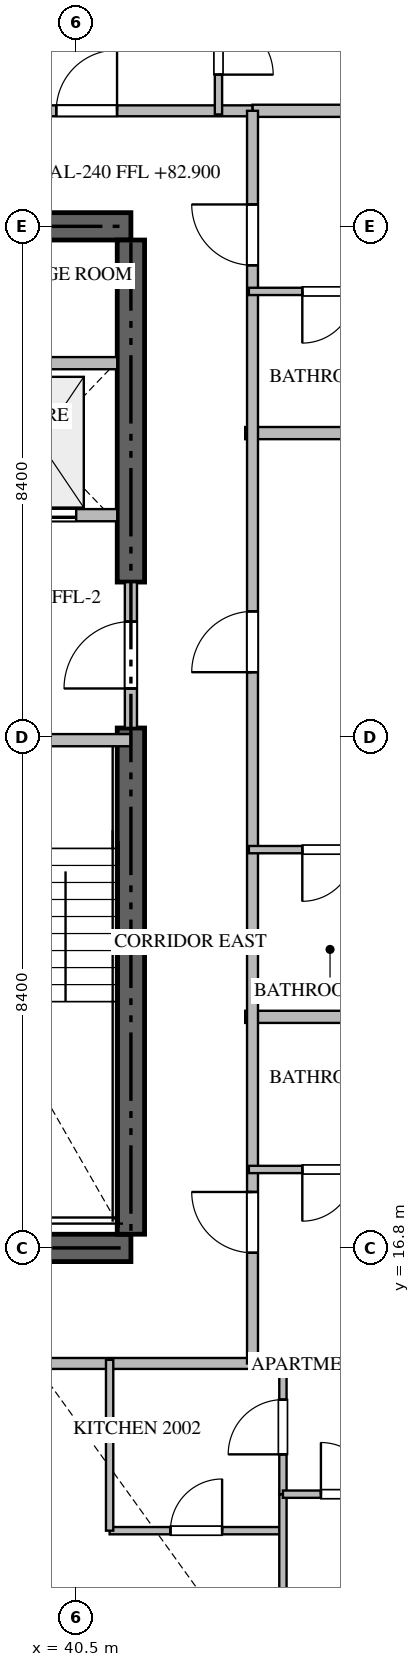
"""IFC4 building model, lengths in metres.
Left out: names, types, materials, properties, quantities, classifications, styles, units other than length and angle.
Written with IfcOpenShell. Run it as: python <this file> out.ifc"""

import sys

from ifc_helpers import new_model, si_unit, direction, frame, frame_2d, origin, place, context, subcontext, project, spatial, rectangle, extrude, source, transform, mapped, element, fill, save


model = new_model("IFC4")
c1 = context("Model", 3, precision=1e-05, world=origin(), true_north=direction((0.0, 1.0)))
c2 = subcontext(c1, "Body", "Model", "MODEL_VIEW")
j1 = project(units=[si_unit("LENGTHUNIT", "METRE"), si_unit("PLANEANGLEUNIT", "RADIAN")], contexts=[c1])
p1 = place(None, origin())
s1 = spatial("IfcSite", under=j1, at=p1, CompositionType="ELEMENT")
p2 = place(p1, origin())
s2 = spatial("IfcBuilding", under=s1, at=p2, CompositionType="ELEMENT")
p3 = place(p2, frame((0.0, 0.0, 82.95)))
s3 = spatial("IfcBuildingStorey", under=s2, at=p3, CompositionType="ELEMENT", Elevation=82.95)
for number, where, z_axis, x_axis in (
    (1, (23.4, 16.8, -0.26), (0.0, 0.0, 1.0), (1.0, 0.0, 0.0)),
    (2, (41.4, 33.6, -0.26), (0.0, 0.0, 1.0), (-1.0, 0.0, 0.0)),
):
    element("IfcWall", number, at=place(p3, frame(where, z_axis=z_axis, x_axis=x_axis)), inside=s3, PredefinedType="SHEAR", context=c2, shape_type="SweptSolid", body=[
        extrude(rectangle(XDim=18.0, YDim=0.45, at=frame_2d((9.0, 0.0))), origin(), (0.0, 0.0, 1.0), 3.748),
    ])
p4 = place(p3, frame((41.4, 17.025, -0.26), z_axis=(0.0, 0.0, 1.0), x_axis=(0.0, 1.0, 0.0)))
e3 = element("IfcWall", 3, at=p4, inside=s3, PredefinedType="SHEAR", context=c2, shape_type="SweptSolid", body=[
    extrude(rectangle(XDim=8.325, YDim=0.45, at=frame_2d((4.163, 0.0))), origin(), (0.0, 0.0, 1.0), 3.748),
])
p5 = place(p3, frame((41.4, 27.75, -0.26), z_axis=(0.0, 0.0, 1.0), x_axis=(0.0, 1.0, 0.0)))
e4 = element("IfcWall", 4, at=p5, inside=s3, PredefinedType="SHEAR", context=c2, shape_type="SweptSolid", body=[
    extrude(rectangle(XDim=5.625, YDim=0.45, at=frame_2d((2.812, 0.0))), origin(), (0.0, 0.0, 1.0), 3.748),
])
p6 = place(p3, frame((36.95, 25.15, 0.0), z_axis=(0.0, 0.0, 1.0), x_axis=(1.0, 0.0, 0.0)))
e5 = element("IfcWall", 5, at=p6, inside=s3, PredefinedType="STANDARD", context=c2, shape_type="SweptSolid", body=[
    extrude(rectangle(XDim=4.45, YDim=0.2, at=frame_2d((2.225, 0.0))), origin(), (0.0, 0.0, 1.0), 3.49),
])
p7 = place(p6, frame((1.65, 0.0, 0.0)))
e6 = element("IfcOpeningElement", 6, at=p7, cuts=e5, PredefinedType="OPENING", context=c2, shape_type="SweptSolid", body=[
    extrude(rectangle(XDim=1.1, YDim=2.15, at=frame_2d((0.55, 1.075))), frame((0.0, 0.11, 0.0), z_axis=(0.0, -1.0, 0.0), x_axis=(1.0, 0.0, 0.0)), (0.0, 0.0, 1.0), 0.22),
])
p8 = place(p3, frame((38.75, 28.85, 0.0), z_axis=(0.0, 0.0, 1.0), x_axis=(1.0, 0.0, 0.0)))
e7 = element("IfcWall", 7, at=p8, inside=s3, PredefinedType="STANDARD", context=c2, shape_type="SweptSolid", body=[
    extrude(rectangle(XDim=2.425, YDim=0.2, at=frame_2d((1.212, 0.0))), origin(), (0.0, 0.0, 1.0), 3.49),
])
p9 = place(p8, frame((0.55, 0.0, 0.0)))
e8 = element("IfcOpeningElement", 8, at=p9, cuts=e7, PredefinedType="OPENING", context=c2, shape_type="SweptSolid", body=[
    extrude(rectangle(XDim=1.2, YDim=2.2, at=frame_2d((0.6, 1.1))), frame((0.0, 0.11, 0.0), z_axis=(0.0, -1.0, 0.0), x_axis=(1.0, 0.0, 0.0)), (0.0, 0.0, 1.0), 0.22),
])
p10 = place(p3, frame((38.75, 31.35, 0.0), z_axis=(0.0, 0.0, 1.0), x_axis=(1.0, 0.0, 0.0)))
e9 = element("IfcWall", 9, at=p10, inside=s3, PredefinedType="STANDARD", context=c2, shape_type="SweptSolid", body=[
    extrude(rectangle(XDim=2.425, YDim=0.2, at=frame_2d((1.212, 0.0))), origin(), (0.0, 0.0, 1.0), 3.49),
])
p11 = place(p3, frame((41.4, 25.352, 0.0), z_axis=(0.0, 0.0, 1.0), x_axis=(0.0, 1.0, 0.0)))
e10 = element("IfcWall", 10, at=p11, inside=s3, PredefinedType="STANDARD", context=c2, shape_type="SweptSolid", body=[
    extrude(rectangle(XDim=2.396, YDim=0.2, at=frame_2d((1.198, 0.0))), origin(), (0.0, 0.0, 1.0), 3.49),
])
p12 = place(p11, frame((0.648, 0.0, 0.0)))
e11 = element("IfcOpeningElement", 11, at=p12, cuts=e10, PredefinedType="OPENING", context=c2, shape_type="SweptSolid", body=[
    extrude(rectangle(XDim=1.1, YDim=2.15, at=frame_2d((0.55, 1.075))), frame((0.0, 0.11, 0.0), z_axis=(0.0, -1.0, 0.0), x_axis=(1.0, 0.0, 0.0)), (0.0, 0.0, 1.0), 0.22),
])
for number, where, z_axis, x_axis in (
    (12, (43.28, 20.6, 0.0), (0.0, 0.0, 1.0), (1.0, 0.0, 0.0)),
    (13, (43.28, 30.2, 0.0), (0.0, 0.0, 1.0), (1.0, 0.0, 0.0)),
):
    element("IfcWall", number, at=place(p3, frame(where, z_axis=z_axis, x_axis=x_axis)), inside=s3, PredefinedType="PARTITIONING", context=c2, shape_type="SweptSolid", body=[
        extrude(rectangle(XDim=15.438, YDim=0.2, at=frame_2d((7.719, 0.0))), origin(), (0.0, 0.0, 1.0), 3.49),
    ])
for number, where, z_axis, x_axis in (
    (14, (43.4, 14.9, 0.0), (0.0, 0.0, 1.0), (1.0, 0.0, 0.0)),
    (15, (43.4, 35.5, 0.0), (0.0, 0.0, 1.0), (1.0, 0.0, 0.0)),
):
    element("IfcWall", number, at=place(p3, frame(where, z_axis=z_axis, x_axis=x_axis)), inside=s3, PredefinedType="PARTITIONING", context=c2, shape_type="SweptSolid", body=[
        extrude(rectangle(XDim=15.318, YDim=0.2, at=frame_2d((7.659, 0.0))), origin(), (0.0, 0.0, 1.0), 3.49),
    ])
p13 = place(p3, frame((21.402, 14.9, 0.0), z_axis=(0.0, 0.0, 1.0), x_axis=(1.0, 0.0, 0.0)))
e16 = element("IfcWall", 16, at=p13, inside=s3, PredefinedType="PARTITIONING", context=c2, shape_type="SweptSolid", body=[
    extrude(rectangle(XDim=21.996, YDim=0.18, at=frame_2d((10.998, 0.0))), origin(), (0.0, 0.0, 1.0), 3.49),
])
p14 = place(p13, frame((5.774, 0.0, 0.0)))
e17 = element("IfcOpeningElement", 17, at=p14, cuts=e16, PredefinedType="OPENING", context=c2, shape_type="SweptSolid", body=[
    extrude(rectangle(XDim=1.0, YDim=2.15, at=frame_2d((0.5, 1.075))), frame((0.0, 0.1, 0.0), z_axis=(0.0, -1.0, 0.0), x_axis=(1.0, 0.0, 0.0)), (0.0, 0.0, 1.0), 0.2),
])
p15 = place(p13, frame((16.272, 0.0, 0.0)))
e18 = element("IfcOpeningElement", 18, at=p15, cuts=e16, PredefinedType="OPENING", context=c2, shape_type="SweptSolid", body=[
    extrude(rectangle(XDim=1.0, YDim=2.15, at=frame_2d((0.5, 1.075))), frame((0.0, 0.1, 0.0), z_axis=(0.0, -1.0, 0.0), x_axis=(1.0, 0.0, 0.0)), (0.0, 0.0, 1.0), 0.2),
])
p16 = place(p3, frame((21.402, 35.5, 0.0), z_axis=(0.0, 0.0, 1.0), x_axis=(1.0, 0.0, 0.0)))
e19 = element("IfcWall", 19, at=p16, inside=s3, PredefinedType="PARTITIONING", context=c2, shape_type="SweptSolid", body=[
    extrude(rectangle(XDim=21.996, YDim=0.18, at=frame_2d((10.998, 0.0))), origin(), (0.0, 0.0, 1.0), 3.49),
])
p17 = place(p16, frame((4.724, 0.0, 0.0)))
e20 = element("IfcOpeningElement", 20, at=p17, cuts=e19, PredefinedType="OPENING", context=c2, shape_type="SweptSolid", body=[
    extrude(rectangle(XDim=1.0, YDim=2.15, at=frame_2d((0.5, 1.075))), frame((0.0, 0.1, 0.0), z_axis=(0.0, -1.0, 0.0), x_axis=(1.0, 0.0, 0.0)), (0.0, 0.0, 1.0), 0.2),
])
p18 = place(p16, frame((18.77, 0.0, 0.0)))
e21 = element("IfcOpeningElement", 21, at=p18, cuts=e19, PredefinedType="OPENING", context=c2, shape_type="SweptSolid", body=[
    extrude(rectangle(XDim=1.0, YDim=2.15, at=frame_2d((0.5, 1.075))), frame((0.0, 0.1, 0.0), z_axis=(0.0, -1.0, 0.0), x_axis=(1.0, 0.0, 0.0)), (0.0, 0.0, 1.0), 0.2),
])
p19 = place(p3, frame((43.4, 14.9, 0.0), z_axis=(0.0, 0.0, 1.0), x_axis=(0.0, 1.0, 0.0)))
e22 = element("IfcWall", 22, at=p19, inside=s3, PredefinedType="PARTITIONING", context=c2, shape_type="SweptSolid", body=[
    extrude(rectangle(XDim=20.6, YDim=0.18, at=frame_2d((10.3, 0.0))), origin(), (0.0, 0.0, 1.0), 3.49),
])
p20 = place(p19, frame((1.82, 0.0, 0.0)))
e23 = element("IfcOpeningElement", 23, at=p20, cuts=e22, PredefinedType="OPENING", context=c2, shape_type="SweptSolid", body=[
    extrude(rectangle(XDim=1.0, YDim=2.15, at=frame_2d((0.5, 1.075))), frame((0.0, 0.1, 0.0), z_axis=(0.0, -1.0, 0.0), x_axis=(1.0, 0.0, 0.0)), (0.0, 0.0, 1.0), 0.2),
])
p21 = place(p19, frame((11.368, 0.0, 0.0)))
e24 = element("IfcOpeningElement", 24, at=p21, cuts=e22, PredefinedType="OPENING", context=c2, shape_type="SweptSolid", body=[
    extrude(rectangle(XDim=1.0, YDim=2.15, at=frame_2d((0.5, 1.075))), frame((0.0, 0.1, 0.0), z_axis=(0.0, -1.0, 0.0), x_axis=(1.0, 0.0, 0.0)), (0.0, 0.0, 1.0), 0.2),
])
p22 = place(p19, frame((18.06, 0.0, 0.0)))
e25 = element("IfcOpeningElement", 25, at=p22, cuts=e22, PredefinedType="OPENING", context=c2, shape_type="SweptSolid", body=[
    extrude(rectangle(XDim=1.0, YDim=2.15, at=frame_2d((0.5, 1.075))), frame((0.0, 0.1, 0.0), z_axis=(0.0, -1.0, 0.0), x_axis=(1.0, 0.0, 0.0)), (0.0, 0.0, 1.0), 0.2),
])
p23 = place(p3, frame((41.05, 12.15, 0.0), z_axis=(0.0, 0.0, 1.0), x_axis=(1.0, 0.0, 0.0)))
e26 = element("IfcWall", 26, at=p23, inside=s3, PredefinedType="PARTITIONING", context=c2, shape_type="SweptSolid", body=[
    extrude(rectangle(XDim=2.85, YDim=0.12, at=frame_2d((1.425, 0.0))), origin(), (0.0, 0.0, 1.0), 3.49),
])
p24 = place(p23, frame((1.0, 0.0, 0.0)))
e27 = element("IfcOpeningElement", 27, at=p24, cuts=e26, PredefinedType="OPENING", context=c2, shape_type="SweptSolid", body=[
    extrude(rectangle(XDim=0.85, YDim=2.1, at=frame_2d((0.425, 1.05))), frame((0.0, 0.07, 0.0), z_axis=(0.0, -1.0, 0.0), x_axis=(1.0, 0.0, 0.0)), (0.0, 0.0, 1.0), 0.14),
])
p25 = place(p3, frame((41.05, 12.15, 0.0), z_axis=(0.0, 0.0, 1.0), x_axis=(0.0, 1.0, 0.0)))
e28 = element("IfcWall", 28, at=p25, inside=s3, PredefinedType="PARTITIONING", context=c2, shape_type="SweptSolid", body=[
    extrude(rectangle(XDim=2.81, YDim=0.12, at=frame_2d((1.405, 0.0))), origin(), (0.0, 0.0, 1.0), 3.49),
])
p26 = place(p3, frame((43.9, 12.75, 0.0), z_axis=(0.0, 0.0, 1.0), x_axis=(0.0, 1.0, 0.0)))
e29 = element("IfcWall", 29, at=p26, inside=s3, PredefinedType="PARTITIONING", context=c2, shape_type="SweptSolid", body=[
    extrude(rectangle(XDim=2.21, YDim=0.12, at=frame_2d((1.105, 0.0))), origin(), (0.0, 0.0, 1.0), 3.49),
])
p27 = place(p26, frame((0.655, 0.0, 0.0)))
e30 = element("IfcOpeningElement", 30, at=p27, cuts=e29, PredefinedType="OPENING", context=c2, shape_type="SweptSolid", body=[
    extrude(rectangle(XDim=0.9, YDim=2.1, at=frame_2d((0.45, 1.05))), frame((0.0, 0.07, 0.0), z_axis=(0.0, -1.0, 0.0), x_axis=(1.0, 0.0, 0.0)), (0.0, 0.0, 1.0), 0.14),
])
p28 = place(p3, frame((43.9, 7.148, 0.0), z_axis=(0.0, 0.0, 1.0), x_axis=(0.0, 1.0, 0.0)))
e31 = element("IfcWall", 31, at=p28, inside=s3, PredefinedType="PARTITIONING", context=c2, shape_type="SweptSolid", body=[
    extrude(rectangle(XDim=5.6, YDim=0.12, at=frame_2d((2.8, 0.0))), origin(), (0.0, 0.0, 1.0), 3.49),
])
p29 = place(p3, frame((43.9, 12.75, 0.0), z_axis=(0.0, 0.0, 1.0), x_axis=(1.0, 0.0, 0.0)))
e32 = element("IfcWall", 32, at=p29, inside=s3, PredefinedType="PARTITIONING", context=c2, shape_type="SweptSolid", body=[
    extrude(rectangle(XDim=2.1, YDim=0.12, at=frame_2d((1.05, 0.0))), origin(), (0.0, 0.0, 1.0), 3.49),
])
p30 = place(p29, frame((0.625, 0.0, 0.0)))
e33 = element("IfcOpeningElement", 33, at=p30, cuts=e32, PredefinedType="OPENING", context=c2, shape_type="SweptSolid", body=[
    extrude(rectangle(XDim=0.85, YDim=2.1, at=frame_2d((0.425, 1.05))), frame((0.0, 0.07, 0.0), z_axis=(0.0, -1.0, 0.0), x_axis=(1.0, 0.0, 0.0)), (0.0, 0.0, 1.0), 0.14),
])
p31 = place(p3, frame((42.84, 37.65, 0.0), z_axis=(0.0, 0.0, 1.0), x_axis=(0.0, -1.0, 0.0)))
e34 = element("IfcWall", 34, at=p31, inside=s3, PredefinedType="PARTITIONING", context=c2, shape_type="SweptSolid", body=[
    extrude(rectangle(XDim=2.21, YDim=0.12, at=frame_2d((1.105, 0.0))), origin(), (0.0, 0.0, 1.0), 3.49),
])
p32 = place(p31, frame((0.655, 0.0, 0.0)))
e35 = element("IfcOpeningElement", 35, at=p32, cuts=e34, PredefinedType="OPENING", context=c2, shape_type="SweptSolid", body=[
    extrude(rectangle(XDim=0.9, YDim=2.1, at=frame_2d((0.45, 1.05))), frame((0.0, 0.07, 0.0), z_axis=(0.0, -1.0, 0.0), x_axis=(1.0, 0.0, 0.0)), (0.0, 0.0, 1.0), 0.14),
])
p33 = place(p3, frame((45.948, 18.09, 0.0), z_axis=(0.0, 0.0, 1.0), x_axis=(-1.0, 0.0, 0.0)))
e36 = element("IfcWall", 36, at=p33, inside=s3, PredefinedType="PARTITIONING", context=c2, shape_type="SweptSolid", body=[
    extrude(rectangle(XDim=2.608, YDim=0.12, at=frame_2d((1.304, 0.0))), origin(), (0.0, 0.0, 1.0), 3.49),
])
p34 = place(p33, frame((0.879, 0.0, 0.0)))
e37 = element("IfcOpeningElement", 37, at=p34, cuts=e36, PredefinedType="OPENING", context=c2, shape_type="SweptSolid", body=[
    extrude(rectangle(XDim=0.85, YDim=2.1, at=frame_2d((0.425, 1.05))), frame((0.0, 0.07, 0.0), z_axis=(0.0, -1.0, 0.0), x_axis=(1.0, 0.0, 0.0)), (0.0, 0.0, 1.0), 0.14),
])
p35 = place(p3, frame((45.948, 23.35, 0.0), z_axis=(0.0, 0.0, 1.0), x_axis=(-1.0, 0.0, 0.0)))
e38 = element("IfcWall", 38, at=p35, inside=s3, PredefinedType="PARTITIONING", context=c2, shape_type="SweptSolid", body=[
    extrude(rectangle(XDim=2.608, YDim=0.12, at=frame_2d((1.304, 0.0))), origin(), (0.0, 0.0, 1.0), 3.49),
])
p36 = place(p35, frame((0.879, 0.0, 0.0)))
e39 = element("IfcOpeningElement", 39, at=p36, cuts=e38, PredefinedType="OPENING", context=c2, shape_type="SweptSolid", body=[
    extrude(rectangle(XDim=0.85, YDim=2.1, at=frame_2d((0.425, 1.05))), frame((0.0, 0.07, 0.0), z_axis=(0.0, -1.0, 0.0), x_axis=(1.0, 0.0, 0.0)), (0.0, 0.0, 1.0), 0.14),
])
p37 = place(p3, frame((45.948, 32.53, 0.0), z_axis=(0.0, 0.0, 1.0), x_axis=(-1.0, 0.0, 0.0)))
e40 = element("IfcWall", 40, at=p37, inside=s3, PredefinedType="PARTITIONING", context=c2, shape_type="SweptSolid", body=[
    extrude(rectangle(XDim=2.608, YDim=0.12, at=frame_2d((1.304, 0.0))), origin(), (0.0, 0.0, 1.0), 3.49),
])
p38 = place(p37, frame((0.879, 0.0, 0.0)))
e41 = element("IfcOpeningElement", 41, at=p38, cuts=e40, PredefinedType="OPENING", context=c2, shape_type="SweptSolid", body=[
    extrude(rectangle(XDim=0.85, YDim=2.1, at=frame_2d((0.425, 1.05))), frame((0.0, 0.07, 0.0), z_axis=(0.0, -1.0, 0.0), x_axis=(1.0, 0.0, 0.0)), (0.0, 0.0, 1.0), 0.14),
])
m1 = source(origin(), c2, "Body", "SweptSolid", [
    extrude(rectangle(XDim=1.2, YDim=2.2, at=frame_2d((0.6, 1.1))), frame((0.0, 0.025, 0.0), z_axis=(0.0, -1.0, 0.0), x_axis=(1.0, 0.0, 0.0)), (0.0, 0.0, 1.0), 0.05),
])
p39 = place(p9, origin())
e42 = element("IfcDoor", 42, at=p39, inside=s3, OperationType="DOUBLE_DOOR_SLIDING", PredefinedType="DOOR", context=c2, shape_type="MappedRepresentation", body=[
    mapped(m1, transform((0.0, 0.0, 0.0), scale=1.0)),
])
fill(e8, e42)
m2 = source(origin(), c2, "Body", "SweptSolid", [
    extrude(rectangle(XDim=1.1, YDim=2.15, at=frame_2d((0.55, 1.075))), frame((0.0, 0.025, 0.0), z_axis=(0.0, -1.0, 0.0), x_axis=(1.0, 0.0, 0.0)), (0.0, 0.0, 1.0), 0.05),
])
p40 = place(p12, origin())
e43 = element("IfcDoor", 43, at=p40, inside=s3, OperationType="SINGLE_SWING_LEFT", PredefinedType="DOOR", context=c2, shape_type="MappedRepresentation", body=[
    mapped(m2, transform((0.0, 0.0, 0.0), scale=1.0)),
])
fill(e11, e43)
m3 = source(origin(), c2, "Body", "SweptSolid", [
    extrude(rectangle(XDim=1.0, YDim=2.15, at=frame_2d((0.5, 1.075))), frame((0.0, 0.025, 0.0), z_axis=(0.0, -1.0, 0.0), x_axis=(1.0, 0.0, 0.0)), (0.0, 0.0, 1.0), 0.05),
])
p41 = place(p18, origin())
e44 = element("IfcDoor", 44, at=p41, inside=s3, OperationType="SINGLE_SWING_RIGHT", PredefinedType="DOOR", context=c2, shape_type="MappedRepresentation", body=[
    mapped(m3, transform((0.0, 0.0, 0.0), scale=1.0)),
])
fill(e21, e44)
p42 = place(p20, origin())
e45 = element("IfcDoor", 45, at=p42, inside=s3, OperationType="SINGLE_SWING_RIGHT", PredefinedType="DOOR", context=c2, shape_type="MappedRepresentation", body=[
    mapped(m3, transform((0.0, 0.0, 0.0), scale=1.0)),
])
fill(e23, e45)
p43 = place(p21, origin())
e46 = element("IfcDoor", 46, at=p43, inside=s3, OperationType="SINGLE_SWING_LEFT", PredefinedType="DOOR", context=c2, shape_type="MappedRepresentation", body=[
    mapped(m3, transform((0.0, 0.0, 0.0), scale=1.0)),
])
fill(e24, e46)
p44 = place(p22, origin())
e47 = element("IfcDoor", 47, at=p44, inside=s3, OperationType="SINGLE_SWING_RIGHT", PredefinedType="DOOR", context=c2, shape_type="MappedRepresentation", body=[
    mapped(m3, transform((0.0, 0.0, 0.0), scale=1.0)),
])
fill(e25, e47)
m4 = source(origin(), c2, "Body", "SweptSolid", [
    extrude(rectangle(XDim=0.85, YDim=2.1, at=frame_2d((0.425, 1.05))), frame((0.0, 0.025, 0.0), z_axis=(0.0, -1.0, 0.0), x_axis=(1.0, 0.0, 0.0)), (0.0, 0.0, 1.0), 0.05),
])
p45 = place(p24, origin())
e48 = element("IfcDoor", 48, at=p45, inside=s3, OperationType="SINGLE_SWING_RIGHT", PredefinedType="DOOR", context=c2, shape_type="MappedRepresentation", body=[
    mapped(m4, transform((0.0, 0.0, 0.0), scale=1.0)),
])
fill(e27, e48)
m5 = source(origin(), c2, "Body", "SweptSolid", [
    extrude(rectangle(XDim=0.9, YDim=2.1, at=frame_2d((0.45, 1.05))), frame((0.0, 0.025, 0.0), z_axis=(0.0, -1.0, 0.0), x_axis=(1.0, 0.0, 0.0)), (0.0, 0.0, 1.0), 0.05),
])
p46 = place(p27, origin())
e49 = element("IfcDoor", 49, at=p46, inside=s3, OperationType="SINGLE_SWING_LEFT", PredefinedType="DOOR", context=c2, shape_type="MappedRepresentation", body=[
    mapped(m5, transform((0.0, 0.0, 0.0), scale=1.0)),
])
fill(e30, e49)
p47 = place(p30, origin())
e50 = element("IfcDoor", 50, at=p47, inside=s3, OperationType="SINGLE_SWING_LEFT", PredefinedType="DOOR", context=c2, shape_type="MappedRepresentation", body=[
    mapped(m4, transform((0.0, 0.0, 0.0), scale=1.0)),
])
fill(e33, e50)
p48 = place(p32, origin())
e51 = element("IfcDoor", 51, at=p48, inside=s3, OperationType="SINGLE_SWING_RIGHT", PredefinedType="DOOR", context=c2, shape_type="MappedRepresentation", body=[
    mapped(m5, transform((0.0, 0.0, 0.0), scale=1.0)),
])
fill(e35, e51)
p49 = place(p34, origin())
e52 = element("IfcDoor", 52, at=p49, inside=s3, OperationType="SINGLE_SWING_RIGHT", PredefinedType="DOOR", context=c2, shape_type="MappedRepresentation", body=[
    mapped(m4, transform((0.0, 0.0, 0.0), scale=1.0)),
])
fill(e37, e52)
p50 = place(p36, origin())
e53 = element("IfcDoor", 53, at=p50, inside=s3, OperationType="SINGLE_SWING_RIGHT", PredefinedType="DOOR", context=c2, shape_type="MappedRepresentation", body=[
    mapped(m4, transform((0.0, 0.0, 0.0), scale=1.0)),
])
fill(e39, e53)
p51 = place(p38, origin())
e54 = element("IfcDoor", 54, at=p51, inside=s3, OperationType="SINGLE_SWING_RIGHT", PredefinedType="DOOR", context=c2, shape_type="MappedRepresentation", body=[
    mapped(m4, transform((0.0, 0.0, 0.0), scale=1.0)),
])
fill(e41, e54)
save(model, sys.argv[1])
